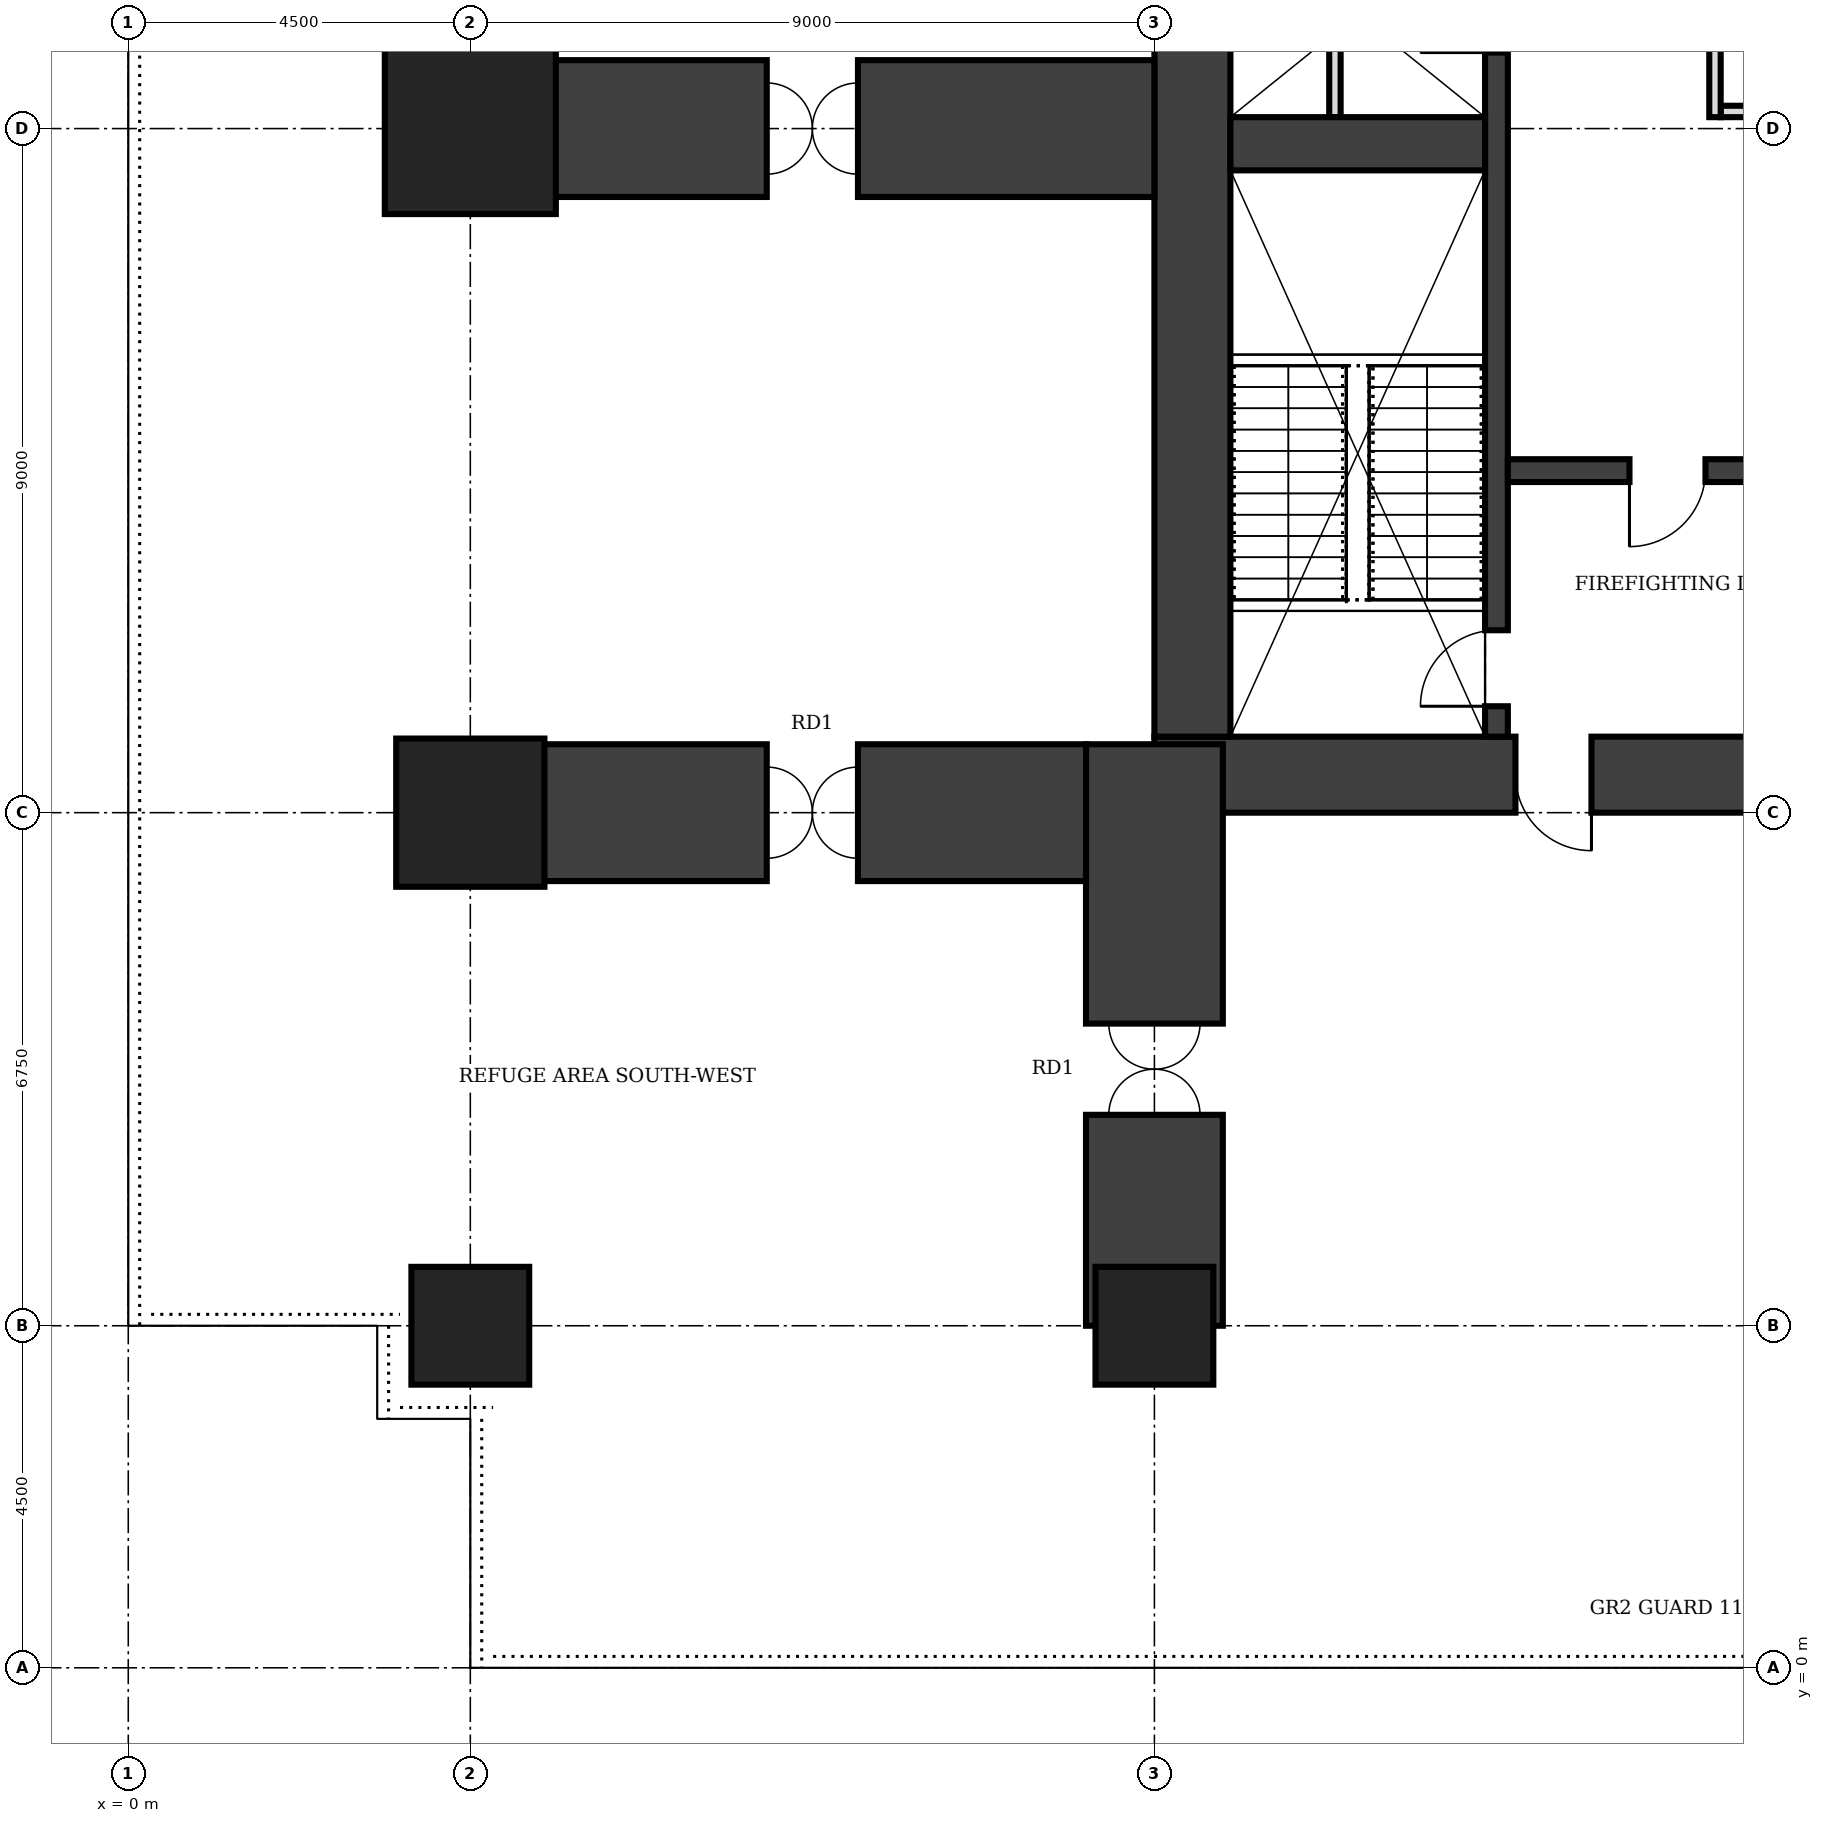
"""IFC4 building model, lengths in metres.
Left out: names, types, materials, properties, quantities, classifications, styles, units other than length and angle.
Written with IfcOpenShell. Run it as: python <this file> out.ifc"""

import sys

from ifc_helpers import new_model, si_unit, direction, frame, frame_2d, origin, origin_2d, place, context, subcontext, project, spatial, rectangle, extrude, element, fill, save


model = new_model("IFC4")
c1 = context("Model", 3, precision=1e-05, world=origin(), true_north=direction((0.0, 1.0)))
c2 = subcontext(c1, "Body", "Model", "MODEL_VIEW")
j1 = project(units=[si_unit("LENGTHUNIT", "METRE"), si_unit("PLANEANGLEUNIT", "RADIAN")], contexts=[c1])
p1 = place(None, origin())
s1 = spatial("IfcSite", under=j1, at=p1, CompositionType="ELEMENT")
p2 = place(p1, origin())
s2 = spatial("IfcBuilding", under=s1, at=p2, CompositionType="ELEMENT")
p3 = place(p2, frame((0.0, 0.0, 245.0)))
s3 = spatial("IfcBuildingStorey", under=s2, at=p3, CompositionType="ELEMENT", Elevation=245.0)
p4 = place(p3, frame((13.5, 11.75, 0.0), z_axis=(0.0, 0.0, 1.0), x_axis=(1.0, 0.0, 0.0)))
e1 = element("IfcWall", 1, at=p4, inside=s3, PredefinedType="SHEAR", context=c2, shape_type="SweptSolid", body=[
    extrude(rectangle(XDim=13.5, YDim=1.0, at=frame_2d((6.75, 0.0))), origin(), (0.0, 0.0, 1.0), 8.0),
])
p5 = place(p4, frame((4.75, 0.0, 0.0)))
e2 = element("IfcOpeningElement", 2, at=p5, cuts=e1, PredefinedType="OPENING", context=c2, shape_type="SweptSolid", body=[
    extrude(rectangle(XDim=1.0, YDim=2.1, at=frame_2d((0.5, 1.05))), frame((0.0, 0.51, 0.0), z_axis=(0.0, -1.0, 0.0), x_axis=(1.0, 0.0, 0.0)), (0.0, 0.0, 1.0), 1.02),
])
p6 = place(p3, frame((14.0, 28.25, 0.0), z_axis=(0.0, 0.0, 1.0), x_axis=(0.0, -1.0, 0.0)))
e3 = element("IfcWall", 3, at=p6, inside=s3, PredefinedType="SHEAR", context=c2, shape_type="SweptSolid", body=[
    extrude(rectangle(XDim=16.0, YDim=1.0, at=frame_2d((8.0, 0.0))), origin(), (0.0, 0.0, 1.0), 8.0),
])
p7 = place(p3, frame((18.0, 12.25, 0.0), z_axis=(0.0, 0.0, 1.0), x_axis=(0.0, 1.0, 0.0)))
e4 = element("IfcWall", 4, at=p7, inside=s3, PredefinedType="SHEAR", context=c2, shape_type="SweptSolid", body=[
    extrude(rectangle(XDim=16.0, YDim=0.3, at=frame_2d((8.0, 0.0))), origin(), (0.0, 0.0, 1.0), 8.0),
])
p8 = place(p7, frame((0.4, 0.0, 0.0)))
e5 = element("IfcOpeningElement", 5, at=p8, cuts=e4, PredefinedType="OPENING", context=c2, shape_type="SweptSolid", body=[
    extrude(rectangle(XDim=1.0, YDim=2.1, at=frame_2d((0.5, 1.05))), frame((0.0, 0.16, 0.0), z_axis=(0.0, -1.0, 0.0), x_axis=(1.0, 0.0, 0.0)), (0.0, 0.0, 1.0), 0.32),
])
p9 = place(p7, frame((14.525, 0.0, 0.0)))
e6 = element("IfcOpeningElement", 6, at=p9, cuts=e4, PredefinedType="OPENING", context=c2, shape_type="SweptSolid", body=[
    extrude(rectangle(XDim=1.1, YDim=2.1, at=frame_2d((0.55, 1.05))), frame((0.0, 0.16, 0.0), z_axis=(0.0, -1.0, 0.0), x_axis=(1.0, 0.0, 0.0)), (0.0, 0.0, 1.0), 0.32),
])
p10 = place(p7, frame((9.0, 0.0, 0.0)))
e7 = element("IfcOpeningElement", 7, at=p10, cuts=e4, PredefinedType="OPENING", context=c2, shape_type="SweptSolid", body=[
    extrude(rectangle(XDim=1.0, YDim=2.1, at=frame_2d((0.5, 1.05))), frame((0.0, 0.16, 0.0), z_axis=(0.0, -1.0, 0.0), x_axis=(1.0, 0.0, 0.0)), (0.0, 0.0, 1.0), 0.32),
])
p11 = place(p7, frame((12.0, 0.0, 0.0)))
e8 = element("IfcOpeningElement", 8, at=p11, cuts=e4, PredefinedType="OPENING", context=c2, shape_type="SweptSolid", body=[
    extrude(rectangle(XDim=1.0, YDim=2.1, at=frame_2d((0.5, 1.05))), frame((0.0, 0.16, 0.0), z_axis=(0.0, -1.0, 0.0), x_axis=(1.0, 0.0, 0.0)), (0.0, 0.0, 1.0), 0.32),
])
p12 = place(p3, frame((14.5, 20.05, 0.0), z_axis=(0.0, 0.0, 1.0), x_axis=(1.0, 0.0, 0.0)))
e9 = element("IfcWall", 9, at=p12, inside=s3, PredefinedType="SHEAR", context=c2, shape_type="SweptSolid", body=[
    extrude(rectangle(XDim=3.35, YDim=0.7, at=frame_2d((1.675, 0.0))), origin(), (0.0, 0.0, 1.0), 8.0),
])
p13 = place(p3, frame((18.15, 15.75, 0.0), z_axis=(0.0, 0.0, 1.0), x_axis=(1.0, 0.0, 0.0)))
e10 = element("IfcWall", 10, at=p13, inside=s3, PredefinedType="SHEAR", context=c2, shape_type="SweptSolid", body=[
    extrude(rectangle(XDim=4.2, YDim=0.3, at=frame_2d((2.1, 0.0))), origin(), (0.0, 0.0, 1.0), 8.0),
])
p14 = place(p13, frame((1.6, 0.0, 0.0)))
e11 = element("IfcOpeningElement", 11, at=p14, cuts=e10, PredefinedType="OPENING", context=c2, shape_type="SweptSolid", body=[
    extrude(rectangle(XDim=1.0, YDim=2.1, at=frame_2d((0.5, 1.05))), frame((0.0, 0.16, 0.0), z_axis=(0.0, -1.0, 0.0), x_axis=(1.0, 0.0, 0.0)), (0.0, 0.0, 1.0), 0.32),
])
for number, where, z_axis, x_axis in (
    (12, (4.5, 4.5, 0.0), (0.0, 0.0, 1.0), (1.0, 0.0, 0.0)),
    (13, (13.5, 4.5, 0.0), (0.0, 0.0, 1.0), (1.0, 0.0, 0.0)),
):
    element("IfcColumn", number, at=place(p3, frame(where, z_axis=z_axis, x_axis=x_axis)), inside=s3, PredefinedType="COLUMN", context=c2, shape_type="SweptSolid", body=[
        extrude(rectangle(XDim=1.55, YDim=1.55, at=origin_2d()), origin(), (0.0, 0.0, 1.0), 8.0),
    ])
p15 = place(p3, frame((4.5, 11.25, 0.0), z_axis=(0.0, 0.0, 1.0), x_axis=(1.0, 0.0, 0.0)))
e14 = element("IfcColumn", 14, at=p15, inside=s3, PredefinedType="COLUMN", context=c2, shape_type="SweptSolid", body=[
    extrude(rectangle(XDim=1.95, YDim=1.95, at=origin_2d()), origin(), (0.0, 0.0, 1.0), 8.0),
])
p16 = place(p3, frame((4.5, 20.25, 0.0), z_axis=(0.0, 0.0, 1.0), x_axis=(1.0, 0.0, 0.0)))
e15 = element("IfcColumn", 15, at=p16, inside=s3, PredefinedType="COLUMN", context=c2, shape_type="SweptSolid", body=[
    extrude(rectangle(XDim=2.25, YDim=2.25, at=origin_2d()), origin(), (0.0, 0.0, 1.0), 8.0),
])
p17 = place(p3, frame((13.5, 4.5, 0.0), z_axis=(0.0, 0.0, 1.0), x_axis=(0.0, 1.0, 0.0)))
e16 = element("IfcWall", 16, at=p17, inside=s3, PredefinedType="SHEAR", context=c2, shape_type="SweptSolid", body=[
    extrude(rectangle(XDim=7.65, YDim=1.8, at=frame_2d((3.825, 0.0))), origin(), (0.0, 0.0, 1.0), 8.0),
])
p18 = place(p17, frame((2.775, 0.0, 0.0)))
e17 = element("IfcOpeningElement", 17, at=p18, cuts=e16, PredefinedType="OPENING", context=c2, shape_type="SweptSolid", body=[
    extrude(rectangle(XDim=1.2, YDim=2.1, at=frame_2d((0.6, 1.05))), frame((0.0, 0.91, 0.0), z_axis=(0.0, -1.0, 0.0), x_axis=(1.0, 0.0, 0.0)), (0.0, 0.0, 1.0), 1.82),
])
p19 = place(p3, frame((4.5, 20.25, 0.0), z_axis=(0.0, 0.0, 1.0), x_axis=(1.0, 0.0, 0.0)))
e18 = element("IfcWall", 18, at=p19, inside=s3, PredefinedType="SHEAR", context=c2, shape_type="SweptSolid", body=[
    extrude(rectangle(XDim=9.0, YDim=1.8, at=frame_2d((4.5, 0.0))), origin(), (0.0, 0.0, 1.0), 8.0),
])
p20 = place(p19, frame((3.9, 0.0, 0.0)))
e19 = element("IfcOpeningElement", 19, at=p20, cuts=e18, PredefinedType="OPENING", context=c2, shape_type="SweptSolid", body=[
    extrude(rectangle(XDim=1.2, YDim=2.1, at=frame_2d((0.6, 1.05))), frame((0.0, 0.91, 0.0), z_axis=(0.0, -1.0, 0.0), x_axis=(1.0, 0.0, 0.0)), (0.0, 0.0, 1.0), 1.82),
])
p21 = place(p3, frame((4.5, 11.25, 0.0), z_axis=(0.0, 0.0, 1.0), x_axis=(1.0, 0.0, 0.0)))
e20 = element("IfcWall", 20, at=p21, inside=s3, PredefinedType="SHEAR", context=c2, shape_type="SweptSolid", body=[
    extrude(rectangle(XDim=8.1, YDim=1.8, at=frame_2d((4.05, 0.0))), origin(), (0.0, 0.0, 1.0), 8.0),
])
p22 = place(p21, frame((3.9, 0.0, 0.0)))
e21 = element("IfcOpeningElement", 21, at=p22, cuts=e20, PredefinedType="OPENING", context=c2, shape_type="SweptSolid", body=[
    extrude(rectangle(XDim=1.2, YDim=2.1, at=frame_2d((0.6, 1.05))), frame((0.0, 0.91, 0.0), z_axis=(0.0, -1.0, 0.0), x_axis=(1.0, 0.0, 0.0)), (0.0, 0.0, 1.0), 1.82),
])
p23 = place(p3, frame((20.875, 20.4, 0.0), z_axis=(0.0, 0.0, 1.0), x_axis=(0.0, 1.0, 0.0)))
e22 = element("IfcWall", 22, at=p23, inside=s3, PredefinedType="PARTITIONING", context=c2, shape_type="SweptSolid", body=[
    extrude(rectangle(XDim=6.0, YDim=0.15, at=frame_2d((3.0, 0.0))), origin(), (0.0, 0.0, 1.0), 7.75),
])
p24 = place(p23, frame((2.55, 0.0, 0.0)))
e23 = element("IfcOpeningElement", 23, at=p24, cuts=e22, PredefinedType="OPENING", context=c2, shape_type="SweptSolid", body=[
    extrude(rectangle(XDim=0.9, YDim=2.1, at=frame_2d((0.45, 1.05))), frame((0.0, 0.085, 0.0), z_axis=(0.0, -1.0, 0.0), x_axis=(1.0, 0.0, 0.0)), (0.0, 0.0, 1.0), 0.17),
])
p25 = place(p3, frame((20.95, 20.475, 0.0), z_axis=(0.0, 0.0, 1.0), x_axis=(1.0, 0.0, 0.0)))
e24 = element("IfcWall", 24, at=p25, inside=s3, PredefinedType="PARTITIONING", context=c2, shape_type="SweptSolid", body=[
    extrude(rectangle(XDim=1.4, YDim=0.15, at=frame_2d((0.7, 0.0))), origin(), (0.0, 0.0, 1.0), 7.75),
])
p26 = place(p3, frame((15.875, 20.4, 0.0), z_axis=(0.0, 0.0, 1.0), x_axis=(0.0, 1.0, 0.0)))
e25 = element("IfcWall", 25, at=p26, inside=s3, PredefinedType="PARTITIONING", context=c2, shape_type="SweptSolid", body=[
    extrude(rectangle(XDim=2.7, YDim=0.15, at=frame_2d((1.35, 0.0))), origin(), (0.0, 0.0, 1.0), 7.75),
])
p27 = place(p26, frame((0.9, 0.0, 0.0)))
e26 = element("IfcOpeningElement", 26, at=p27, cuts=e25, PredefinedType="OPENING", context=c2, shape_type="SweptSolid", body=[
    extrude(rectangle(XDim=0.9, YDim=2.1, at=frame_2d((0.45, 1.05))), frame((0.0, 0.085, 0.0), z_axis=(0.0, -1.0, 0.0), x_axis=(1.0, 0.0, 0.0)), (0.0, 0.0, 1.0), 0.17),
])
p28 = place(p5, frame((1.0, 0.0, 0.0), z_axis=(0.0, 0.0, 1.0), x_axis=(-1.0, 0.0, 0.0)))
e27 = element("IfcDoor", 27, at=p28, inside=s3, OperationType="SINGLE_SWING_LEFT", PredefinedType="DOOR", context=c2, shape_type="SweptSolid", body=[
    extrude(rectangle(XDim=1.0, YDim=2.1, at=frame_2d((0.5, 1.05))), frame((0.0, 0.025, 0.0), z_axis=(0.0, -1.0, 0.0), x_axis=(1.0, 0.0, 0.0)), (0.0, 0.0, 1.0), 0.05),
])
fill(e2, e27)
p29 = place(p14, frame((1.0, 0.0, 0.0), z_axis=(0.0, 0.0, 1.0), x_axis=(-1.0, 0.0, 0.0)))
e28 = element("IfcDoor", 28, at=p29, inside=s3, OperationType="SINGLE_SWING_RIGHT", PredefinedType="DOOR", context=c2, shape_type="SweptSolid", body=[
    extrude(rectangle(XDim=1.0, YDim=2.1, at=frame_2d((0.5, 1.05))), frame((0.0, 0.025, 0.0), z_axis=(0.0, -1.0, 0.0), x_axis=(1.0, 0.0, 0.0)), (0.0, 0.0, 1.0), 0.05),
])
fill(e11, e28)
p30 = place(p8, origin())
e29 = element("IfcDoor", 29, at=p30, inside=s3, OperationType="SINGLE_SWING_LEFT", PredefinedType="DOOR", context=c2, shape_type="SweptSolid", body=[
    extrude(rectangle(XDim=1.0, YDim=2.1, at=frame_2d((0.5, 1.05))), frame((0.0, 0.025, 0.0), z_axis=(0.0, -1.0, 0.0), x_axis=(1.0, 0.0, 0.0)), (0.0, 0.0, 1.0), 0.05),
])
fill(e5, e29)
p31 = place(p18, origin())
e30 = element("IfcDoor", 30, at=p31, inside=s3, OperationType="DOUBLE_DOOR_DOUBLE_SWING", PredefinedType="DOOR", context=c2, shape_type="SweptSolid", body=[
    extrude(rectangle(XDim=1.2, YDim=2.1, at=frame_2d((0.6, 1.05))), frame((0.0, 0.025, 0.0), z_axis=(0.0, -1.0, 0.0), x_axis=(1.0, 0.0, 0.0)), (0.0, 0.0, 1.0), 0.05),
])
fill(e17, e30)
p32 = place(p20, origin())
e31 = element("IfcDoor", 31, at=p32, inside=s3, OperationType="DOUBLE_DOOR_DOUBLE_SWING", PredefinedType="DOOR", context=c2, shape_type="SweptSolid", body=[
    extrude(rectangle(XDim=1.2, YDim=2.1, at=frame_2d((0.6, 1.05))), frame((0.0, 0.025, 0.0), z_axis=(0.0, -1.0, 0.0), x_axis=(1.0, 0.0, 0.0)), (0.0, 0.0, 1.0), 0.05),
])
fill(e19, e31)
p33 = place(p22, origin())
e32 = element("IfcDoor", 32, at=p33, inside=s3, OperationType="DOUBLE_DOOR_DOUBLE_SWING", PredefinedType="DOOR", context=c2, shape_type="SweptSolid", body=[
    extrude(rectangle(XDim=1.2, YDim=2.1, at=frame_2d((0.6, 1.05))), frame((0.0, 0.025, 0.0), z_axis=(0.0, -1.0, 0.0), x_axis=(1.0, 0.0, 0.0)), (0.0, 0.0, 1.0), 0.05),
])
fill(e21, e32)
save(model, sys.argv[1])
